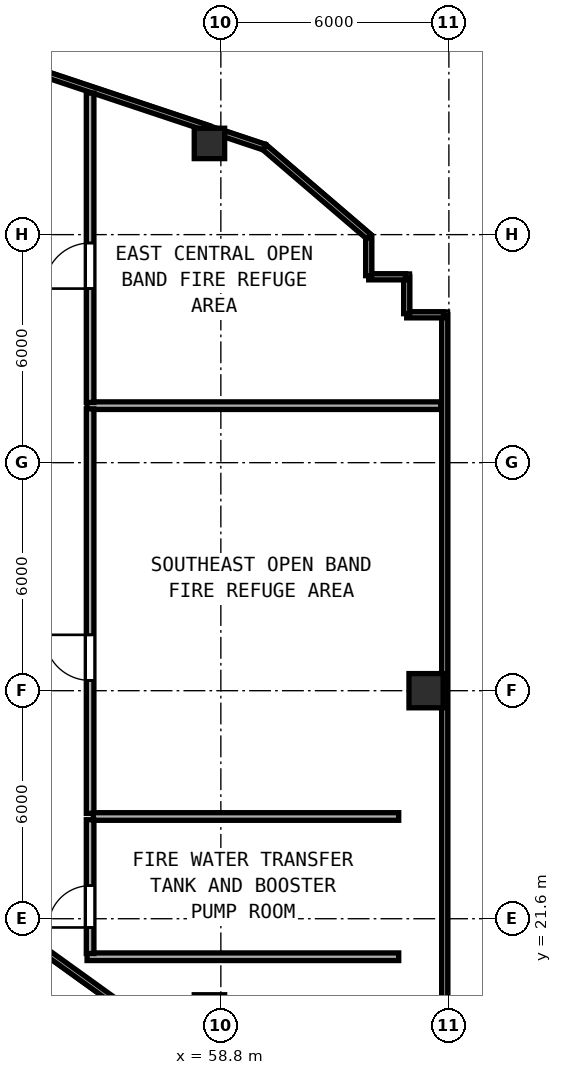
"""IFC4 building model, lengths in metres.
Left out: names, types, materials, properties, quantities, classifications, styles, units other than length and angle.
Written with IfcOpenShell. Run it as: python <this file> out.ifc"""

import sys

from ifc_helpers import new_model, si_unit, direction, frame, frame_2d, origin, origin_2d, place, context, subcontext, project, spatial, rectangle, hollow_rectangle, extrude, element, fill, save


model = new_model("IFC4")
c1 = context("Model", 3, precision=1e-05, world=origin(), true_north=direction((0.0, 1.0)))
c2 = subcontext(c1, "Body", "Model", "MODEL_VIEW")
j1 = project(units=[si_unit("LENGTHUNIT", "METRE"), si_unit("PLANEANGLEUNIT", "RADIAN")], contexts=[c1])
p1 = place(None, origin())
s1 = spatial("IfcSite", under=j1, at=p1, CompositionType="ELEMENT")
p2 = place(p1, origin())
s2 = spatial("IfcBuilding", under=s1, at=p2, CompositionType="ELEMENT")
p3 = place(p2, frame((0.0, 0.0, 207.0)))
s3 = spatial("IfcBuildingStorey", under=s2, at=p3, CompositionType="ELEMENT", Elevation=207.0)
p4 = place(p3, frame((64.2, 27.6, 0.0), z_axis=(0.0, 0.0, 1.0), x_axis=(1.0, 0.0, 0.0)))
e1 = element("IfcColumn", 1, at=p4, inside=s3, PredefinedType="COLUMN", context=c2, shape_type="SweptSolid", body=[
    extrude(hollow_rectangle(XDim=0.9, YDim=0.9, WallThickness=0.034, at=origin_2d()), origin(), (0.0, 0.0, 1.0), 4.6),
])
p5 = place(p3, frame((58.5, 42.0, 0.0), z_axis=(0.0, 0.0, 1.0), x_axis=(1.0, 0.0, 0.0)))
e2 = element("IfcColumn", 2, at=p5, inside=s3, PredefinedType="COLUMN", context=c2, shape_type="SweptSolid", body=[
    extrude(hollow_rectangle(XDim=0.8, YDim=0.8, WallThickness=0.03, at=origin_2d()), origin(), (0.0, 0.0, 1.0), 4.6),
])
p6 = place(p3, frame((53.242, 21.417, 0.0), z_axis=(0.0, 0.0, 1.0), x_axis=(0.811537125723, -0.584300858782, 0.0)))
e3 = element("IfcWall", 3, at=p6, inside=s3, PredefinedType="PARAPET", context=c2, shape_type="SweptSolid", body=[
    extrude(rectangle(XDim=11.642, YDim=0.16, at=frame_2d((5.821, 0.0))), origin(), (0.0, 0.0, 1.0), 1.15),
])
p7 = place(p3, frame((64.69, 16.51, 0.0), z_axis=(0.0, 0.0, 1.0), x_axis=(0.0, 1.0, 0.0)))
e4 = element("IfcWall", 4, at=p7, inside=s3, PredefinedType="PARAPET", context=c2, shape_type="SweptSolid", body=[
    extrude(rectangle(XDim=20.98, YDim=0.16, at=frame_2d((10.49, 0.0))), origin(), (0.0, 0.0, 1.0), 1.15),
])
for number, where, z_axis, x_axis in (
    (5, (64.66, 37.49, 0.0), (0.0, 0.0, 1.0), (-1.0, 0.0, 0.0)),
    (6, (63.69, 37.52, 0.0), (0.0, 0.0, 1.0), (0.0, 1.0, 0.0)),
    (7, (63.66, 38.49, 0.0), (0.0, 0.0, 1.0), (-1.0, 0.0, 0.0)),
):
    element("IfcWall", number, at=place(p3, frame(where, z_axis=z_axis, x_axis=x_axis)), inside=s3, PredefinedType="PARAPET", context=c2, shape_type="SweptSolid", body=[
        extrude(rectangle(XDim=0.97, YDim=0.16, at=frame_2d((0.485, 0.0))), origin(), (0.0, 0.0, 1.0), 1.15),
    ])
p8 = place(p3, frame((62.69, 38.52, 0.0), z_axis=(0.0, 0.0, 1.0), x_axis=(0.0, 1.0, 0.0)))
e8 = element("IfcWall", 8, at=p8, inside=s3, PredefinedType="PARAPET", context=c2, shape_type="SweptSolid", body=[
    extrude(rectangle(XDim=1.029, YDim=0.16, at=frame_2d((0.515, 0.0))), origin(), (0.0, 0.0, 1.0), 1.15),
])
p9 = place(p3, frame((62.69, 39.549, 0.0), z_axis=(0.0, 0.0, 1.0), x_axis=(-0.759213704594, 0.650841417518, 0.0)))
e9 = element("IfcWall", 9, at=p9, inside=s3, PredefinedType="PARAPET", context=c2, shape_type="SweptSolid", body=[
    extrude(rectangle(XDim=3.616, YDim=0.16, at=frame_2d((1.808, 0.0))), origin(), (0.0, 0.0, 1.0), 1.15),
])
p10 = place(p3, frame((59.945, 41.903, 0.0), z_axis=(0.0, 0.0, 1.0), x_axis=(-0.948705297269, 0.316161760709, 0.0)))
e10 = element("IfcWall", 10, at=p10, inside=s3, PredefinedType="PARAPET", context=c2, shape_type="SweptSolid", body=[
    extrude(rectangle(XDim=1.11, YDim=0.16, at=frame_2d((0.555, 0.0))), origin(), (0.0, 0.0, 1.0), 1.15),
])
p11 = place(p3, frame((58.476, 42.392, 0.0), z_axis=(0.0, 0.0, 1.0), x_axis=(-0.948687300706, 0.316215757798, 0.0)))
e11 = element("IfcWall", 11, at=p11, inside=s3, PredefinedType="PARAPET", context=c2, shape_type="SweptSolid", body=[
    extrude(rectangle(XDim=6.099, YDim=0.16, at=frame_2d((3.05, 0.0))), origin(), (0.0, 0.0, 1.0), 1.15),
])
p12 = place(p3, frame((55.28, 35.1, 0.0), z_axis=(0.0, 0.0, 1.0), x_axis=(1.0, 0.0, 0.0)))
e12 = element("IfcWall", 12, at=p12, inside=s3, PredefinedType="SOLIDWALL", context=c2, shape_type="SweptSolid", body=[
    extrude(rectangle(XDim=9.308, YDim=0.2, at=frame_2d((4.654, 0.0))), origin(), (0.0, 0.0, 1.0), 4.42),
])
p13 = place(p3, frame((55.36, 24.37, 0.0), z_axis=(0.0, 0.0, 1.0), x_axis=(0.0, 1.0, 0.0)))
e13 = element("IfcWall", 13, at=p13, inside=s3, PredefinedType="SOLIDWALL", context=c2, shape_type="SweptSolid", body=[
    extrude(rectangle(XDim=10.645, YDim=0.2, at=frame_2d((5.322, 0.0))), origin(), (0.0, 0.0, 1.0), 4.42),
])
p14 = place(p13, frame((3.5, 0.0, 0.0)))
e14 = element("IfcOpeningElement", 14, at=p14, cuts=e13, PredefinedType="OPENING", context=c2, shape_type="SweptSolid", body=[
    extrude(rectangle(XDim=1.2, YDim=2.15, at=frame_2d((0.6, 1.075))), frame((0.0, 0.11, 0.0), z_axis=(0.0, -1.0, 0.0), x_axis=(1.0, 0.0, 0.0)), (0.0, 0.0, 1.0), 0.22),
])
p15 = place(p3, frame((55.36, 35.185, 0.0), z_axis=(0.0, 0.0, 1.0), x_axis=(0.0, 1.0, 0.0)))
e15 = element("IfcWall", 15, at=p15, inside=s3, PredefinedType="SOLIDWALL", context=c2, shape_type="SweptSolid", body=[
    extrude(rectangle(XDim=8.138, YDim=0.2, at=frame_2d((4.069, 0.0))), origin(), (0.0, 0.0, 1.0), 4.42),
])
p16 = place(p15, frame((2.995, 0.0, 0.0)))
e16 = element("IfcOpeningElement", 16, at=p16, cuts=e15, PredefinedType="OPENING", context=c2, shape_type="SweptSolid", body=[
    extrude(rectangle(XDim=1.2, YDim=2.15, at=frame_2d((0.6, 1.075))), frame((0.0, 0.11, 0.0), z_axis=(0.0, -1.0, 0.0), x_axis=(1.0, 0.0, 0.0)), (0.0, 0.0, 1.0), 0.22),
])
p17 = place(p3, frame((55.445, 24.29, 0.0), z_axis=(0.0, 0.0, 1.0), x_axis=(1.0, 0.0, 0.0)))
e17 = element("IfcWall", 17, at=p17, inside=s3, PredefinedType="SOLIDWALL", context=c2, shape_type="SweptSolid", body=[
    extrude(rectangle(XDim=8.035, YDim=0.2, at=frame_2d((4.018, 0.0))), origin(), (0.0, 0.0, 1.0), 4.42),
])
p18 = place(p3, frame((55.28, 20.6, 0.0), z_axis=(0.0, 0.0, 1.0), x_axis=(1.0, 0.0, 0.0)))
e18 = element("IfcWall", 18, at=p18, inside=s3, PredefinedType="SOLIDWALL", context=c2, shape_type="SweptSolid", body=[
    extrude(rectangle(XDim=8.2, YDim=0.2, at=frame_2d((4.1, 0.0))), origin(), (0.0, 0.0, 1.0), 4.42),
])
p19 = place(p3, frame((55.36, 20.685, 0.0), z_axis=(0.0, 0.0, 1.0), x_axis=(0.0, 1.0, 0.0)))
e19 = element("IfcWall", 19, at=p19, inside=s3, PredefinedType="SOLIDWALL", context=c2, shape_type="SweptSolid", body=[
    extrude(rectangle(XDim=3.52, YDim=0.2, at=frame_2d((1.76, 0.0))), origin(), (0.0, 0.0, 1.0), 4.42),
])
p20 = place(p19, frame((0.685, 0.0, 0.0)))
e20 = element("IfcOpeningElement", 20, at=p20, cuts=e19, PredefinedType="OPENING", context=c2, shape_type="SweptSolid", body=[
    extrude(rectangle(XDim=1.1, YDim=2.15, at=frame_2d((0.55, 1.075))), frame((0.0, 0.11, 0.0), z_axis=(0.0, -1.0, 0.0), x_axis=(1.0, 0.0, 0.0)), (0.0, 0.0, 1.0), 0.22),
])
p21 = place(p14, origin())
e21 = element("IfcDoor", 21, at=p21, inside=s3, OperationType="SINGLE_SWING_RIGHT", PredefinedType="DOOR", context=c2, shape_type="SweptSolid", body=[
    extrude(rectangle(XDim=1.2, YDim=2.15, at=frame_2d((0.6, 1.075))), frame((0.0, 0.025, 0.0), z_axis=(0.0, -1.0, 0.0), x_axis=(1.0, 0.0, 0.0)), (0.0, 0.0, 1.0), 0.05),
])
fill(e14, e21)
p22 = place(p16, origin())
e22 = element("IfcDoor", 22, at=p22, inside=s3, OperationType="SINGLE_SWING_LEFT", PredefinedType="DOOR", context=c2, shape_type="SweptSolid", body=[
    extrude(rectangle(XDim=1.2, YDim=2.15, at=frame_2d((0.6, 1.075))), frame((0.0, 0.025, 0.0), z_axis=(0.0, -1.0, 0.0), x_axis=(1.0, 0.0, 0.0)), (0.0, 0.0, 1.0), 0.05),
])
fill(e16, e22)
p23 = place(p20, origin())
e23 = element("IfcDoor", 23, at=p23, inside=s3, OperationType="SINGLE_SWING_LEFT", PredefinedType="DOOR", context=c2, shape_type="SweptSolid", body=[
    extrude(rectangle(XDim=1.1, YDim=2.15, at=frame_2d((0.55, 1.075))), frame((0.0, 0.025, 0.0), z_axis=(0.0, -1.0, 0.0), x_axis=(1.0, 0.0, 0.0)), (0.0, 0.0, 1.0), 0.05),
])
fill(e20, e23)
save(model, sys.argv[1])
